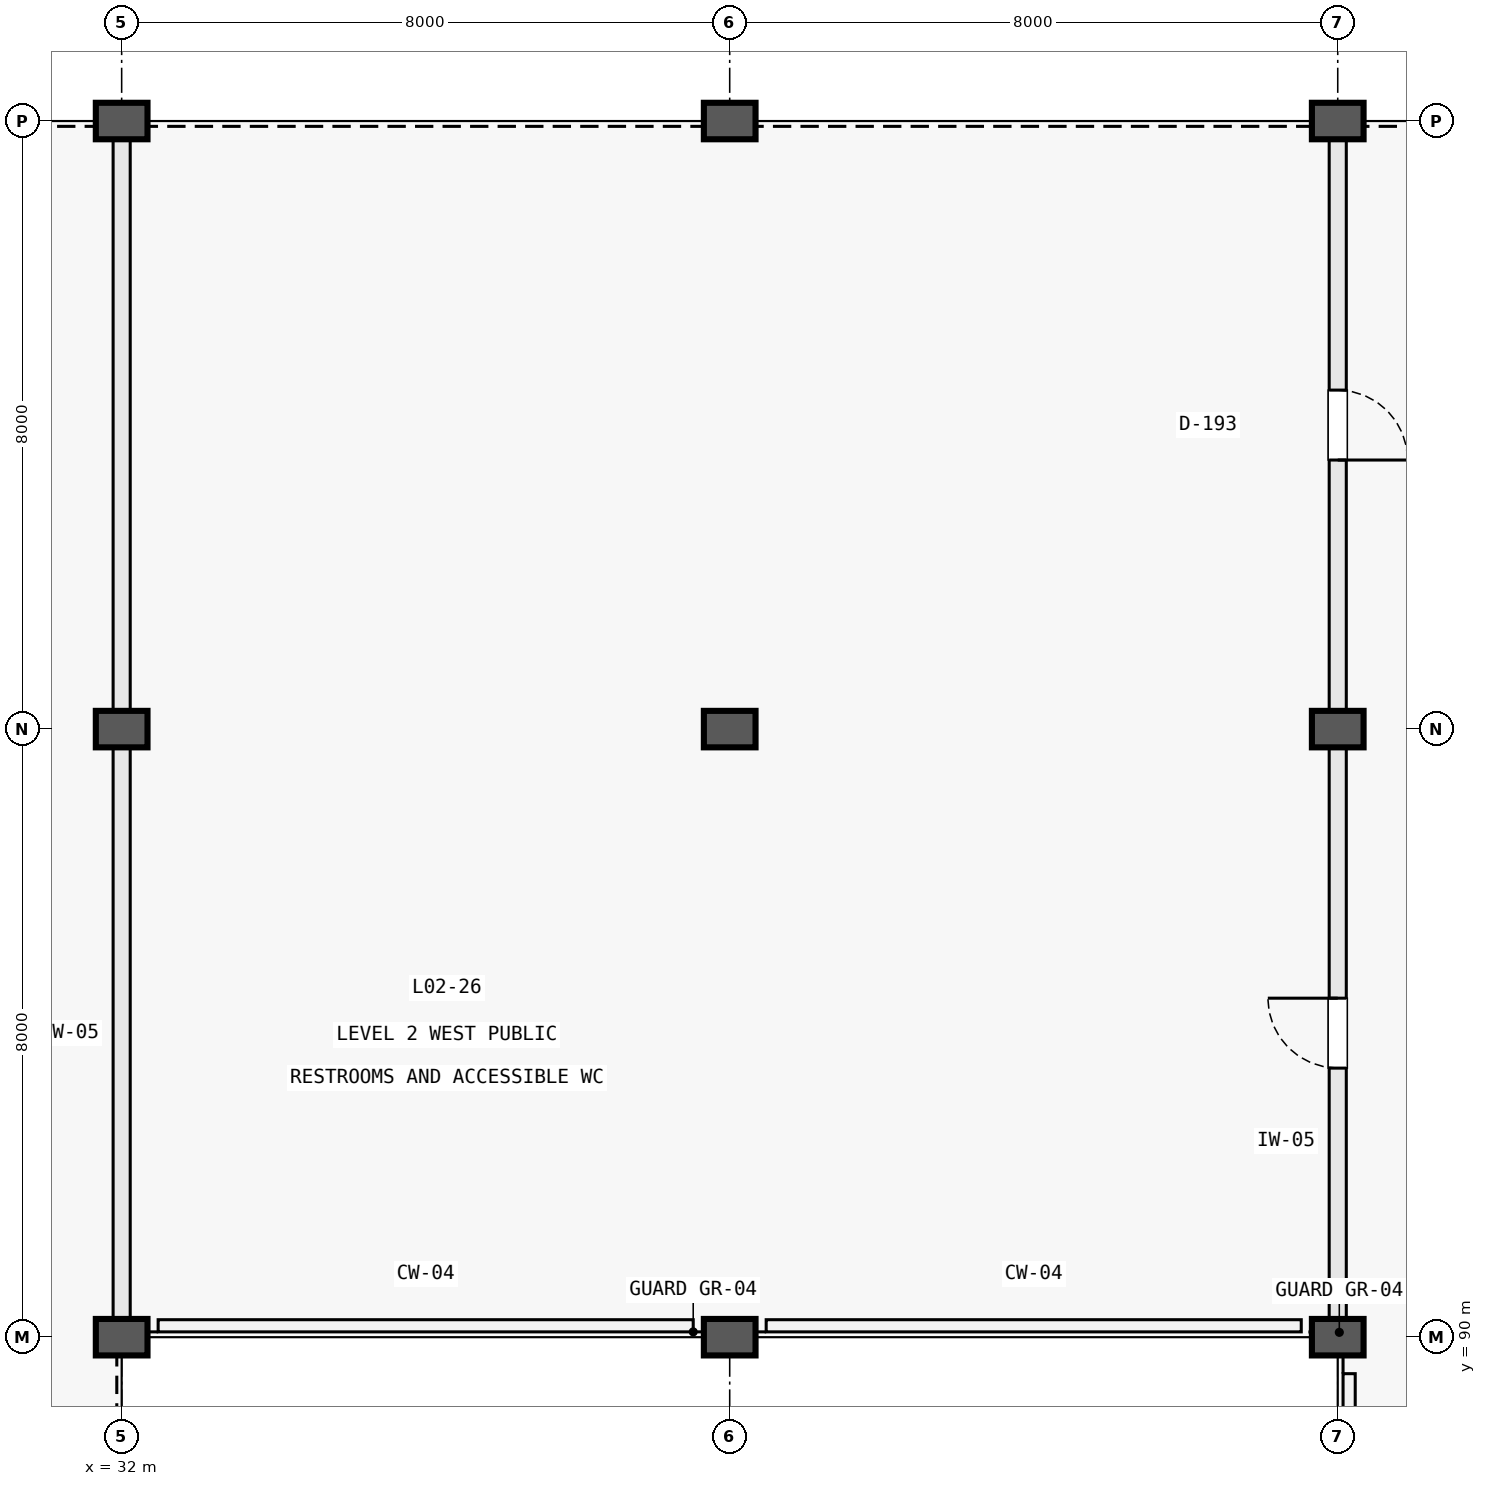
"""IFC4 building model, lengths in metres.
Left out: names, types, materials, properties, quantities, classifications, styles, units other than length and angle.
Written with IfcOpenShell. Run it as: python <this file> out.ifc"""

import sys

from ifc_helpers import new_model, si_unit, direction, frame, frame_2d, origin, origin_2d, place, context, subcontext, project, spatial, rectangle, extrude, element, fill, save


model = new_model("IFC4")
c1 = context("Model", 3, precision=1e-05, world=origin(), true_north=direction((0.0, 1.0)))
c2 = subcontext(c1, "Body", "Model", "MODEL_VIEW")
j1 = project(units=[si_unit("LENGTHUNIT", "METRE"), si_unit("PLANEANGLEUNIT", "RADIAN")], contexts=[c1])
p1 = place(None, origin())
s1 = spatial("IfcSite", under=j1, at=p1, CompositionType="ELEMENT")
p2 = place(p1, origin())
s2 = spatial("IfcBuilding", under=s1, at=p2, CompositionType="ELEMENT")
p3 = place(p2, frame((0.0, 0.0, 5.4)))
s3 = spatial("IfcBuildingStorey", under=s2, at=p3, CompositionType="ELEMENT", Elevation=5.4)
for number, where, z_axis, x_axis in (
    (1, (32.0, 90.0, 0.0), (0.0, 0.0, 1.0), (1.0, 0.0, 0.0)),
    (2, (32.0, 98.0, 0.0), (0.0, 0.0, 1.0), (1.0, 0.0, 0.0)),
    (3, (32.0, 106.0, 0.0), (0.0, 0.0, 1.0), (1.0, 0.0, 0.0)),
    (4, (40.0, 90.0, 0.0), (0.0, 0.0, 1.0), (1.0, 0.0, 0.0)),
    (5, (40.0, 98.0, 0.0), (0.0, 0.0, 1.0), (1.0, 0.0, 0.0)),
    (6, (40.0, 106.0, 0.0), (0.0, 0.0, 1.0), (1.0, 0.0, 0.0)),
    (7, (48.0, 90.0, 0.0), (0.0, 0.0, 1.0), (1.0, 0.0, 0.0)),
    (8, (48.0, 98.0, 0.0), (0.0, 0.0, 1.0), (1.0, 0.0, 0.0)),
    (9, (48.0, 106.0, 0.0), (0.0, 0.0, 1.0), (1.0, 0.0, 0.0)),
):
    element("IfcColumn", number, at=place(p3, frame(where, z_axis=z_axis, x_axis=x_axis)), inside=s3, PredefinedType="COLUMN", context=c2, shape_type="SweptSolid", body=[
        extrude(rectangle(XDim=0.68, YDim=0.48, at=origin_2d()), origin(), (0.0, 0.0, 1.0), 5.1),
    ])
p4 = place(p3, frame((48.0, 90.25, 0.0), z_axis=(0.0, 0.0, 1.0), x_axis=(0.0, 1.0, 0.0)))
e10 = element("IfcWall", 10, at=p4, inside=s3, PredefinedType="PARTITIONING", context=c2, shape_type="SweptSolid", body=[
    extrude(rectangle(XDim=7.5, YDim=0.225, at=frame_2d((3.75, 0.0))), origin(), (0.0, 0.0, 1.0), 3.61),
])
p5 = place(p4, frame((3.29, 0.0, 0.0)))
e11 = element("IfcOpeningElement", 11, at=p5, cuts=e10, PredefinedType="OPENING", context=c2, shape_type="SweptSolid", body=[
    extrude(rectangle(XDim=0.92, YDim=2.1, at=frame_2d((0.46, 1.05))), frame((0.0, 0.125, 0.0), z_axis=(0.0, -1.0, 0.0), x_axis=(1.0, 0.0, 0.0)), (0.0, 0.0, 1.0), 0.249),
])
p6 = place(p3, frame((48.0, 98.25, 0.0), z_axis=(0.0, 0.0, 1.0), x_axis=(0.0, 1.0, 0.0)))
e12 = element("IfcWall", 12, at=p6, inside=s3, PredefinedType="PARTITIONING", context=c2, shape_type="SweptSolid", body=[
    extrude(rectangle(XDim=7.5, YDim=0.225, at=frame_2d((3.75, 0.0))), origin(), (0.0, 0.0, 1.0), 3.61),
])
p7 = place(p6, frame((3.29, 0.0, 0.0)))
e13 = element("IfcOpeningElement", 13, at=p7, cuts=e12, PredefinedType="OPENING", context=c2, shape_type="SweptSolid", body=[
    extrude(rectangle(XDim=0.92, YDim=2.1, at=frame_2d((0.46, 1.05))), frame((0.0, 0.125, 0.0), z_axis=(0.0, -1.0, 0.0), x_axis=(1.0, 0.0, 0.0)), (0.0, 0.0, 1.0), 0.249),
])
for number, where, z_axis, x_axis in (
    (14, (32.0, 90.25, 0.0), (0.0, 0.0, 1.0), (0.0, 1.0, 0.0)),
    (15, (32.0, 98.25, 0.0), (0.0, 0.0, 1.0), (0.0, 1.0, 0.0)),
):
    element("IfcWall", number, at=place(p3, frame(where, z_axis=z_axis, x_axis=x_axis)), inside=s3, PredefinedType="PARTITIONING", context=c2, shape_type="SweptSolid", body=[
        extrude(rectangle(XDim=7.5, YDim=0.225, at=frame_2d((3.75, 0.0))), origin(), (0.0, 0.0, 1.0), 3.61),
    ])
p8 = place(p5, origin())
e16 = element("IfcDoor", 16, at=p8, inside=s3, OperationType="SINGLE_SWING_RIGHT", PredefinedType="DOOR", context=c2, shape_type="SweptSolid", body=[
    extrude(rectangle(XDim=0.92, YDim=2.1, at=frame_2d((0.46, 1.05))), frame((0.0, 0.025, 0.0), z_axis=(0.0, -1.0, 0.0), x_axis=(1.0, 0.0, 0.0)), (0.0, 0.0, 1.0), 0.05),
])
fill(e11, e16)
p9 = place(p7, frame((0.92, 0.0, 0.0), z_axis=(0.0, 0.0, 1.0), x_axis=(-1.0, 0.0, 0.0)))
e17 = element("IfcDoor", 17, at=p9, inside=s3, OperationType="SINGLE_SWING_LEFT", PredefinedType="DOOR", context=c2, shape_type="SweptSolid", body=[
    extrude(rectangle(XDim=0.92, YDim=2.1, at=frame_2d((0.46, 1.05))), frame((0.0, 0.025, 0.0), z_axis=(0.0, -1.0, 0.0), x_axis=(1.0, 0.0, 0.0)), (0.0, 0.0, 1.0), 0.05),
])
fill(e13, e17)
save(model, sys.argv[1])
